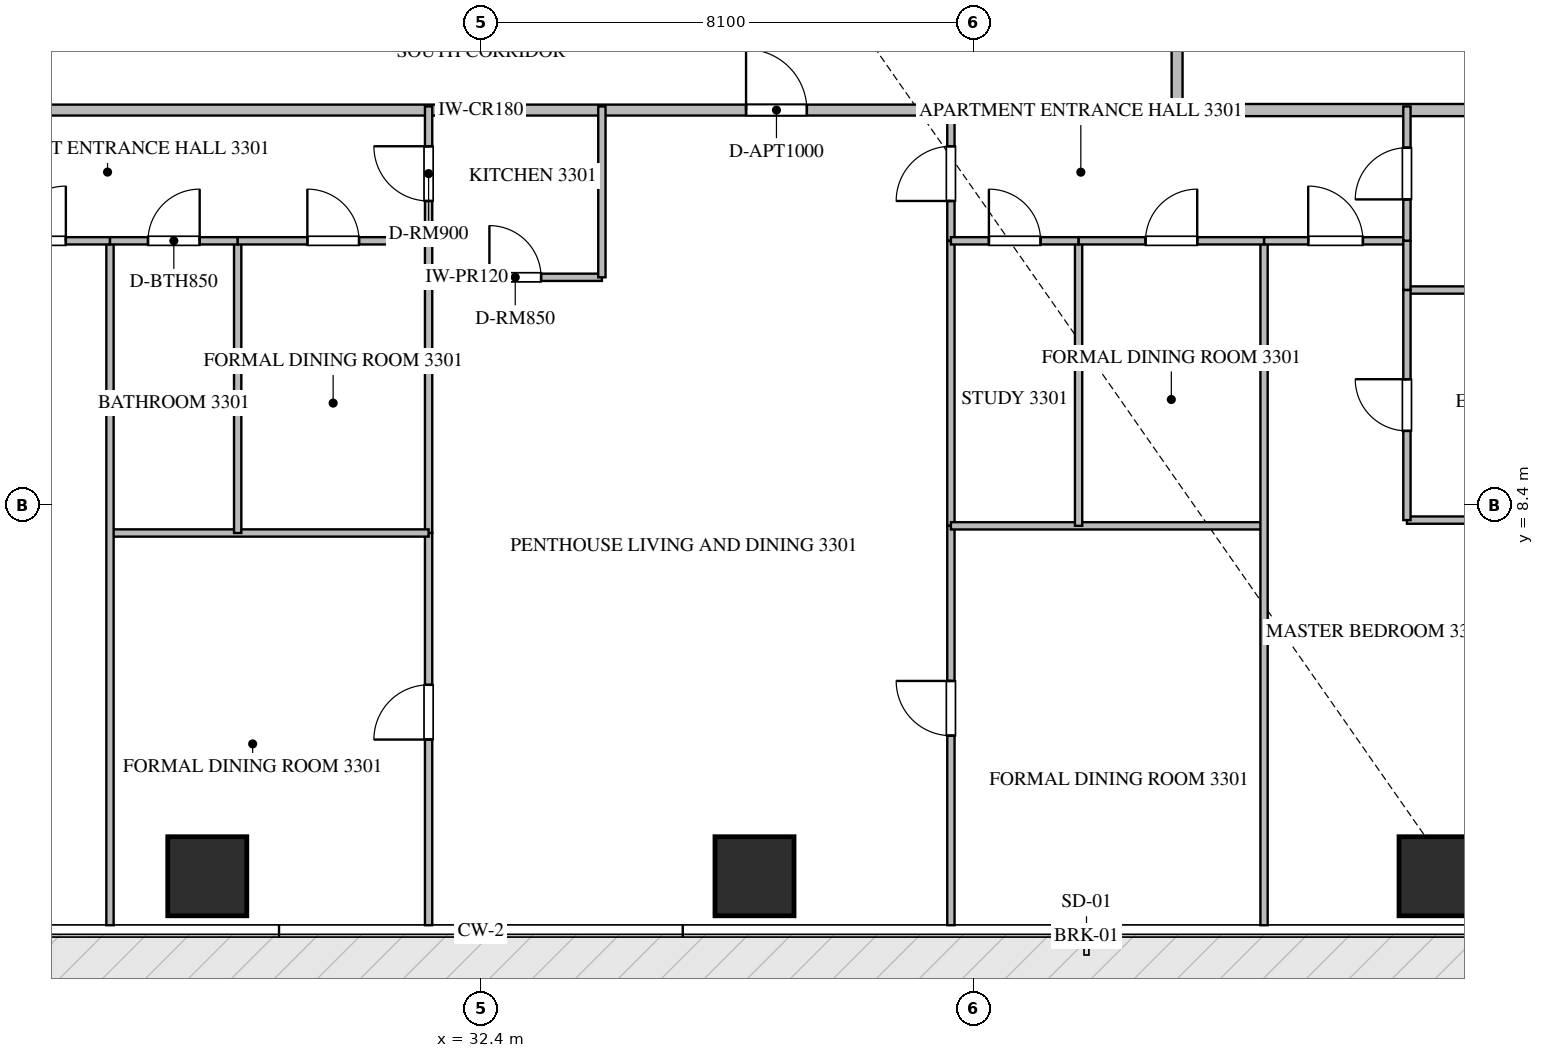
"""IFC4 building model, lengths in metres.
Left out: names, types, materials, properties, quantities, classifications, styles, units other than length and angle.
Written with IfcOpenShell. Run it as: python <this file> out.ifc"""

import sys

from ifc_helpers import new_model, si_unit, direction, frame, frame_2d, origin, origin_2d, place, context, subcontext, project, spatial, rectangle, extrude, source, transform, mapped, element, fill, save


model = new_model("IFC4")
c1 = context("Model", 3, precision=1e-05, world=origin(), true_north=direction((0.0, 1.0)))
c2 = subcontext(c1, "Body", "Model", "MODEL_VIEW")
j1 = project(units=[si_unit("LENGTHUNIT", "METRE"), si_unit("PLANEANGLEUNIT", "RADIAN")], contexts=[c1])
p1 = place(None, origin())
s1 = spatial("IfcSite", under=j1, at=p1, CompositionType="ELEMENT")
p2 = place(p1, origin())
s2 = spatial("IfcBuilding", under=s1, at=p2, CompositionType="ELEMENT")
p3 = place(p2, frame((0.0, 0.0, 135.15)))
s3 = spatial("IfcBuildingStorey", under=s2, at=p3, CompositionType="ELEMENT", Elevation=135.15)
m1 = source(origin(), c2, "Body", "SweptSolid", [
    extrude(rectangle(XDim=1.3, YDim=1.3, at=origin_2d()), origin(), (0.0, 0.0, 1.0), 3.75),
])
for number, where, z_axis, x_axis in (
    (1, (27.9, 2.3, -0.26), (0.0, 0.0, 1.0), (1.0, 0.0, 0.0)),
    (2, (36.9, 2.3, -0.26), (0.0, 0.0, 1.0), (1.0, 0.0, 0.0)),
    (3, (48.15, 2.3, -0.26), (0.0, 0.0, 1.0), (1.0, 0.0, 0.0)),
):
    element("IfcColumn", number, at=place(p3, frame(where, z_axis=z_axis, x_axis=x_axis)), inside=s3, PredefinedType="COLUMN", context=c2, shape_type="MappedRepresentation", body=[
        mapped(m1, transform((0.0, 0.0, 0.0), scale=1.0)),
    ])
p4 = place(p3, frame((43.85, 14.9, 0.0), z_axis=(0.0, 0.0, 1.0), x_axis=(1.0, 0.0, 0.0)))
e4 = element("IfcWall", 4, at=p4, inside=s3, PredefinedType="PARTITIONING", context=c2, shape_type="SweptSolid", body=[
    extrude(rectangle(XDim=13.068, YDim=0.2, at=frame_2d((6.534, 0.0))), origin(), (0.0, 0.0, 1.0), 3.49),
])
p5 = place(p3, frame((20.952, 14.9, 0.0), z_axis=(0.0, 0.0, 1.0), x_axis=(1.0, 0.0, 0.0)))
e5 = element("IfcWall", 5, at=p5, inside=s3, PredefinedType="PARTITIONING", context=c2, shape_type="SweptSolid", body=[
    extrude(rectangle(XDim=22.896, YDim=0.18, at=frame_2d((11.448, 0.0))), origin(), (0.0, 0.0, 1.0), 3.49),
])
p6 = place(p5, frame((15.809, 0.0, 0.0)))
e6 = element("IfcOpeningElement", 6, at=p6, cuts=e5, PredefinedType="OPENING", context=c2, shape_type="SweptSolid", body=[
    extrude(rectangle(XDim=1.0, YDim=2.15, at=frame_2d((0.5, 1.075))), frame((0.0, 0.1, 0.0), z_axis=(0.0, -1.0, 0.0), x_axis=(1.0, 0.0, 0.0)), (0.0, 0.0, 1.0), 0.2),
])
p7 = place(p3, frame((43.85, 14.9, 0.0), z_axis=(0.0, 0.0, 1.0), x_axis=(0.0, 1.0, 0.0)))
e7 = element("IfcWall", 7, at=p7, inside=s3, PredefinedType="PARTITIONING", context=c2, shape_type="SweptSolid", body=[
    extrude(rectangle(XDim=18.7, YDim=0.18, at=frame_2d((9.35, 0.0))), origin(), (0.0, 0.0, 1.0), 3.49),
])
p8 = place(p7, frame((1.805, 0.0, 0.0)))
e8 = element("IfcOpeningElement", 8, at=p8, cuts=e7, PredefinedType="OPENING", context=c2, shape_type="SweptSolid", body=[
    extrude(rectangle(XDim=1.0, YDim=2.15, at=frame_2d((0.5, 1.075))), frame((0.0, 0.1, 0.0), z_axis=(0.0, -1.0, 0.0), x_axis=(1.0, 0.0, 0.0)), (0.0, 0.0, 1.0), 0.2),
])
p9 = place(p3, frame((31.54, 12.15, 0.0), z_axis=(0.0, 0.0, 1.0), x_axis=(1.0, 0.0, 0.0)))
e9 = element("IfcWall", 9, at=p9, inside=s3, PredefinedType="PARTITIONING", context=c2, shape_type="SweptSolid", body=[
    extrude(rectangle(XDim=2.85, YDim=0.12, at=frame_2d((1.425, 0.0))), origin(), (0.0, 0.0, 1.0), 3.49),
])
p10 = place(p9, frame((1.0, 0.0, 0.0)))
e10 = element("IfcOpeningElement", 10, at=p10, cuts=e9, PredefinedType="OPENING", context=c2, shape_type="SweptSolid", body=[
    extrude(rectangle(XDim=0.85, YDim=2.1, at=frame_2d((0.425, 1.05))), frame((0.0, 0.07, 0.0), z_axis=(0.0, -1.0, 0.0), x_axis=(1.0, 0.0, 0.0)), (0.0, 0.0, 1.0), 0.14),
])
p11 = place(p3, frame((34.39, 12.15, 0.0), z_axis=(0.0, 0.0, 1.0), x_axis=(0.0, 1.0, 0.0)))
e11 = element("IfcWall", 11, at=p11, inside=s3, PredefinedType="PARTITIONING", context=c2, shape_type="SweptSolid", body=[
    extrude(rectangle(XDim=2.81, YDim=0.12, at=frame_2d((1.405, 0.0))), origin(), (0.0, 0.0, 1.0), 3.49),
])
p12 = place(p3, frame((31.54, 12.75, 0.0), z_axis=(0.0, 0.0, 1.0), x_axis=(0.0, 1.0, 0.0)))
e12 = element("IfcWall", 12, at=p12, inside=s3, PredefinedType="PARTITIONING", context=c2, shape_type="SweptSolid", body=[
    extrude(rectangle(XDim=2.21, YDim=0.12, at=frame_2d((1.105, 0.0))), origin(), (0.0, 0.0, 1.0), 3.49),
])
p13 = place(p12, frame((0.655, 0.0, 0.0)))
e13 = element("IfcOpeningElement", 13, at=p13, cuts=e12, PredefinedType="OPENING", context=c2, shape_type="SweptSolid", body=[
    extrude(rectangle(XDim=0.9, YDim=2.1, at=frame_2d((0.45, 1.05))), frame((0.0, 0.07, 0.0), z_axis=(0.0, -1.0, 0.0), x_axis=(1.0, 0.0, 0.0)), (0.0, 0.0, 1.0), 0.14),
])
p14 = place(p3, frame((31.54, 1.495, 0.0), z_axis=(0.0, 0.0, 1.0), x_axis=(0.0, 1.0, 0.0)))
e14 = element("IfcWall", 14, at=p14, inside=s3, PredefinedType="PARTITIONING", context=c2, shape_type="SweptSolid", body=[
    extrude(rectangle(XDim=6.45, YDim=0.12, at=frame_2d((3.225, 0.0))), origin(), (0.0, 0.0, 1.0), 3.49),
])
p15 = place(p14, frame((3.053, 0.0, 0.0)))
e15 = element("IfcOpeningElement", 15, at=p15, cuts=e14, PredefinedType="OPENING", context=c2, shape_type="SweptSolid", body=[
    extrude(rectangle(XDim=0.9, YDim=2.1, at=frame_2d((0.45, 1.05))), frame((0.0, 0.07, 0.0), z_axis=(0.0, -1.0, 0.0), x_axis=(1.0, 0.0, 0.0)), (0.0, 0.0, 1.0), 0.14),
])
p16 = place(p3, frame((31.54, 7.947, 0.0), z_axis=(0.0, 0.0, 1.0), x_axis=(0.0, 1.0, 0.0)))
e16 = element("IfcWall", 16, at=p16, inside=s3, PredefinedType="PARTITIONING", context=c2, shape_type="SweptSolid", body=[
    extrude(rectangle(XDim=4.801, YDim=0.12, at=frame_2d((2.4, 0.0))), origin(), (0.0, 0.0, 1.0), 3.49),
])
p17 = place(p3, frame((26.3, 7.945, 0.0), z_axis=(0.0, 0.0, 1.0), x_axis=(1.0, 0.0, 0.0)))
e17 = element("IfcWall", 17, at=p17, inside=s3, PredefinedType="PARTITIONING", context=c2, shape_type="SweptSolid", body=[
    extrude(rectangle(XDim=5.24, YDim=0.12, at=frame_2d((2.62, 0.0))), origin(), (0.0, 0.0, 1.0), 3.49),
])
p18 = place(p3, frame((26.3, 1.495, 0.0), z_axis=(0.0, 0.0, 1.0), x_axis=(0.0, 1.0, 0.0)))
e18 = element("IfcWall", 18, at=p18, inside=s3, PredefinedType="PARTITIONING", context=c2, shape_type="SweptSolid", body=[
    extrude(rectangle(XDim=11.255, YDim=0.12, at=frame_2d((5.627, 0.0))), origin(), (0.0, 0.0, 1.0), 3.49),
])
p19 = place(p3, frame((28.4, 7.945, 0.0), z_axis=(0.0, 0.0, 1.0), x_axis=(0.0, 1.0, 0.0)))
e19 = element("IfcWall", 19, at=p19, inside=s3, PredefinedType="PARTITIONING", context=c2, shape_type="SweptSolid", body=[
    extrude(rectangle(XDim=4.805, YDim=0.12, at=frame_2d((2.402, 0.0))), origin(), (0.0, 0.0, 1.0), 3.49),
])
p20 = place(p3, frame((26.3, 12.75, 0.0), z_axis=(0.0, 0.0, 1.0), x_axis=(1.0, 0.0, 0.0)))
e20 = element("IfcWall", 20, at=p20, inside=s3, PredefinedType="PARTITIONING", context=c2, shape_type="SweptSolid", body=[
    extrude(rectangle(XDim=2.1, YDim=0.12, at=frame_2d((1.05, 0.0))), origin(), (0.0, 0.0, 1.0), 3.49),
])
p21 = place(p20, frame((0.625, 0.0, 0.0)))
e21 = element("IfcOpeningElement", 21, at=p21, cuts=e20, PredefinedType="OPENING", context=c2, shape_type="SweptSolid", body=[
    extrude(rectangle(XDim=0.85, YDim=2.1, at=frame_2d((0.425, 1.05))), frame((0.0, 0.07, 0.0), z_axis=(0.0, -1.0, 0.0), x_axis=(1.0, 0.0, 0.0)), (0.0, 0.0, 1.0), 0.14),
])
p22 = place(p3, frame((28.402, 12.75, 0.0), z_axis=(0.0, 0.0, 1.0), x_axis=(1.0, 0.0, 0.0)))
e22 = element("IfcWall", 22, at=p22, inside=s3, PredefinedType="PARTITIONING", context=c2, shape_type="SweptSolid", body=[
    extrude(rectangle(XDim=3.138, YDim=0.12, at=frame_2d((1.569, 0.0))), origin(), (0.0, 0.0, 1.0), 3.49),
])
p23 = place(p22, frame((1.144, 0.0, 0.0)))
e23 = element("IfcOpeningElement", 23, at=p23, cuts=e22, PredefinedType="OPENING", context=c2, shape_type="SweptSolid", body=[
    extrude(rectangle(XDim=0.85, YDim=2.1, at=frame_2d((0.425, 1.05))), frame((0.0, 0.07, 0.0), z_axis=(0.0, -1.0, 0.0), x_axis=(1.0, 0.0, 0.0)), (0.0, 0.0, 1.0), 0.14),
])
p24 = place(p3, frame((23.95, 12.75, 0.0), z_axis=(0.0, 0.0, 1.0), x_axis=(1.0, 0.0, 0.0)))
e24 = element("IfcWall", 24, at=p24, inside=s3, PredefinedType="PARTITIONING", context=c2, shape_type="SweptSolid", body=[
    extrude(rectangle(XDim=2.348, YDim=0.12, at=frame_2d((1.174, 0.0))), origin(), (0.0, 0.0, 1.0), 3.49),
])
p25 = place(p24, frame((0.724, 0.0, 0.0)))
e25 = element("IfcOpeningElement", 25, at=p25, cuts=e24, PredefinedType="OPENING", context=c2, shape_type="SweptSolid", body=[
    extrude(rectangle(XDim=0.9, YDim=2.1, at=frame_2d((0.45, 1.05))), frame((0.0, 0.07, 0.0), z_axis=(0.0, -1.0, 0.0), x_axis=(1.0, 0.0, 0.0)), (0.0, 0.0, 1.0), 0.14),
])
p26 = place(p3, frame((40.13, 12.75, 0.0), z_axis=(0.0, 0.0, 1.0), x_axis=(0.0, 1.0, 0.0)))
e26 = element("IfcWall", 26, at=p26, inside=s3, PredefinedType="PARTITIONING", context=c2, shape_type="SweptSolid", body=[
    extrude(rectangle(XDim=2.21, YDim=0.12, at=frame_2d((1.105, 0.0))), origin(), (0.0, 0.0, 1.0), 3.49),
])
p27 = place(p26, frame((0.655, 0.0, 0.0)))
e27 = element("IfcOpeningElement", 27, at=p27, cuts=e26, PredefinedType="OPENING", context=c2, shape_type="SweptSolid", body=[
    extrude(rectangle(XDim=0.9, YDim=2.1, at=frame_2d((0.45, 1.05))), frame((0.0, 0.07, 0.0), z_axis=(0.0, -1.0, 0.0), x_axis=(1.0, 0.0, 0.0)), (0.0, 0.0, 1.0), 0.14),
])
p28 = place(p3, frame((40.13, 1.495, 0.0), z_axis=(0.0, 0.0, 1.0), x_axis=(0.0, 1.0, 0.0)))
e28 = element("IfcWall", 28, at=p28, inside=s3, PredefinedType="PARTITIONING", context=c2, shape_type="SweptSolid", body=[
    extrude(rectangle(XDim=6.568, YDim=0.12, at=frame_2d((3.284, 0.0))), origin(), (0.0, 0.0, 1.0), 3.49),
])
p29 = place(p28, frame((3.117, 0.0, 0.0)))
e29 = element("IfcOpeningElement", 29, at=p29, cuts=e28, PredefinedType="OPENING", context=c2, shape_type="SweptSolid", body=[
    extrude(rectangle(XDim=0.9, YDim=2.1, at=frame_2d((0.45, 1.05))), frame((0.0, 0.07, 0.0), z_axis=(0.0, -1.0, 0.0), x_axis=(1.0, 0.0, 0.0)), (0.0, 0.0, 1.0), 0.14),
])
p30 = place(p3, frame((40.13, 8.065, 0.0), z_axis=(0.0, 0.0, 1.0), x_axis=(0.0, 1.0, 0.0)))
e30 = element("IfcWall", 30, at=p30, inside=s3, PredefinedType="PARTITIONING", context=c2, shape_type="SweptSolid", body=[
    extrude(rectangle(XDim=4.683, YDim=0.12, at=frame_2d((2.342, 0.0))), origin(), (0.0, 0.0, 1.0), 3.49),
])
p31 = place(p3, frame((40.13, 8.063, 0.0), z_axis=(0.0, 0.0, 1.0), x_axis=(1.0, 0.0, 0.0)))
e31 = element("IfcWall", 31, at=p31, inside=s3, PredefinedType="PARTITIONING", context=c2, shape_type="SweptSolid", body=[
    extrude(rectangle(XDim=5.15, YDim=0.12, at=frame_2d((2.575, 0.0))), origin(), (0.0, 0.0, 1.0), 3.49),
])
p32 = place(p3, frame((45.28, 1.495, 0.0), z_axis=(0.0, 0.0, 1.0), x_axis=(0.0, 1.0, 0.0)))
e32 = element("IfcWall", 32, at=p32, inside=s3, PredefinedType="PARTITIONING", context=c2, shape_type="SweptSolid", body=[
    extrude(rectangle(XDim=11.255, YDim=0.12, at=frame_2d((5.627, 0.0))), origin(), (0.0, 0.0, 1.0), 3.49),
])
p33 = place(p3, frame((42.23, 8.063, 0.0), z_axis=(0.0, 0.0, 1.0), x_axis=(0.0, 1.0, 0.0)))
e33 = element("IfcWall", 33, at=p33, inside=s3, PredefinedType="PARTITIONING", context=c2, shape_type="SweptSolid", body=[
    extrude(rectangle(XDim=4.687, YDim=0.12, at=frame_2d((2.344, 0.0))), origin(), (0.0, 0.0, 1.0), 3.49),
])
p34 = place(p3, frame((40.13, 12.75, 0.0), z_axis=(0.0, 0.0, 1.0), x_axis=(1.0, 0.0, 0.0)))
e34 = element("IfcWall", 34, at=p34, inside=s3, PredefinedType="PARTITIONING", context=c2, shape_type="SweptSolid", body=[
    extrude(rectangle(XDim=2.1, YDim=0.12, at=frame_2d((1.05, 0.0))), origin(), (0.0, 0.0, 1.0), 3.49),
])
p35 = place(p34, frame((0.625, 0.0, 0.0)))
e35 = element("IfcOpeningElement", 35, at=p35, cuts=e34, PredefinedType="OPENING", context=c2, shape_type="SweptSolid", body=[
    extrude(rectangle(XDim=0.85, YDim=2.1, at=frame_2d((0.425, 1.05))), frame((0.0, 0.07, 0.0), z_axis=(0.0, -1.0, 0.0), x_axis=(1.0, 0.0, 0.0)), (0.0, 0.0, 1.0), 0.14),
])
p36 = place(p3, frame((42.232, 12.75, 0.0), z_axis=(0.0, 0.0, 1.0), x_axis=(1.0, 0.0, 0.0)))
e36 = element("IfcWall", 36, at=p36, inside=s3, PredefinedType="PARTITIONING", context=c2, shape_type="SweptSolid", body=[
    extrude(rectangle(XDim=3.048, YDim=0.12, at=frame_2d((1.524, 0.0))), origin(), (0.0, 0.0, 1.0), 3.49),
])
p37 = place(p36, frame((1.099, 0.0, 0.0)))
e37 = element("IfcOpeningElement", 37, at=p37, cuts=e36, PredefinedType="OPENING", context=c2, shape_type="SweptSolid", body=[
    extrude(rectangle(XDim=0.85, YDim=2.1, at=frame_2d((0.425, 1.05))), frame((0.0, 0.07, 0.0), z_axis=(0.0, -1.0, 0.0), x_axis=(1.0, 0.0, 0.0)), (0.0, 0.0, 1.0), 0.14),
])
p38 = place(p3, frame((45.282, 12.75, 0.0), z_axis=(0.0, 0.0, 1.0), x_axis=(1.0, 0.0, 0.0)))
e38 = element("IfcWall", 38, at=p38, inside=s3, PredefinedType="PARTITIONING", context=c2, shape_type="SweptSolid", body=[
    extrude(rectangle(XDim=2.348, YDim=0.12, at=frame_2d((1.174, 0.0))), origin(), (0.0, 0.0, 1.0), 3.49),
])
p39 = place(p38, frame((0.724, 0.0, 0.0)))
e39 = element("IfcOpeningElement", 39, at=p39, cuts=e38, PredefinedType="OPENING", context=c2, shape_type="SweptSolid", body=[
    extrude(rectangle(XDim=0.9, YDim=2.1, at=frame_2d((0.45, 1.05))), frame((0.0, 0.07, 0.0), z_axis=(0.0, -1.0, 0.0), x_axis=(1.0, 0.0, 0.0)), (0.0, 0.0, 1.0), 0.14),
])
for number, where, z_axis, x_axis in (
    (40, (47.63, 8.157, 0.0), (0.0, 0.0, 1.0), (1.0, 0.0, 0.0)),
    (41, (47.63, 11.941, 0.0), (0.0, 0.0, 1.0), (1.0, 0.0, 0.0)),
):
    element("IfcWall", number, at=place(p3, frame(where, z_axis=z_axis, x_axis=x_axis)), inside=s3, PredefinedType="PARTITIONING", context=c2, shape_type="SweptSolid", body=[
        extrude(rectangle(XDim=3.7, YDim=0.12, at=frame_2d((1.85, 0.0))), origin(), (0.0, 0.0, 1.0), 3.49),
    ])
p40 = place(p3, frame((47.63, 8.157, 0.0), z_axis=(0.0, 0.0, 1.0), x_axis=(0.0, 1.0, 0.0)))
e42 = element("IfcWall", 42, at=p40, inside=s3, PredefinedType="PARTITIONING", context=c2, shape_type="SweptSolid", body=[
    extrude(rectangle(XDim=3.784, YDim=0.12, at=frame_2d((1.892, 0.0))), origin(), (0.0, 0.0, 1.0), 3.49),
])
p41 = place(p40, frame((1.467, 0.0, 0.0)))
e43 = element("IfcOpeningElement", 43, at=p41, cuts=e42, PredefinedType="OPENING", context=c2, shape_type="SweptSolid", body=[
    extrude(rectangle(XDim=0.85, YDim=2.1, at=frame_2d((0.425, 1.05))), frame((0.0, 0.07, 0.0), z_axis=(0.0, -1.0, 0.0), x_axis=(1.0, 0.0, 0.0)), (0.0, 0.0, 1.0), 0.14),
])
p42 = place(p3, frame((47.63, 11.943, 0.0), z_axis=(0.0, 0.0, 1.0), x_axis=(0.0, 1.0, 0.0)))
e44 = element("IfcWall", 44, at=p42, inside=s3, PredefinedType="PARTITIONING", context=c2, shape_type="SweptSolid", body=[
    extrude(rectangle(XDim=0.807, YDim=0.12, at=frame_2d((0.403, 0.0))), origin(), (0.0, 0.0, 1.0), 3.49),
])
p43 = place(p3, frame((47.63, 12.752, 0.0), z_axis=(0.0, 0.0, 1.0), x_axis=(0.0, 1.0, 0.0)))
e45 = element("IfcWall", 45, at=p43, inside=s3, PredefinedType="PARTITIONING", context=c2, shape_type="SweptSolid", body=[
    extrude(rectangle(XDim=2.208, YDim=0.12, at=frame_2d((1.104, 0.0))), origin(), (0.0, 0.0, 1.0), 3.49),
])
p44 = place(p43, frame((0.679, 0.0, 0.0)))
e46 = element("IfcOpeningElement", 46, at=p44, cuts=e45, PredefinedType="OPENING", context=c2, shape_type="SweptSolid", body=[
    extrude(rectangle(XDim=0.85, YDim=2.1, at=frame_2d((0.425, 1.05))), frame((0.0, 0.07, 0.0), z_axis=(0.0, -1.0, 0.0), x_axis=(1.0, 0.0, 0.0)), (0.0, 0.0, 1.0), 0.14),
])
m2 = source(origin(), c2, "Body", "SweptSolid", [
    extrude(rectangle(XDim=1.0, YDim=2.15, at=frame_2d((0.5, 1.075))), frame((0.0, 0.025, 0.0), z_axis=(0.0, -1.0, 0.0), x_axis=(1.0, 0.0, 0.0)), (0.0, 0.0, 1.0), 0.05),
])
p45 = place(p6, origin())
e47 = element("IfcDoor", 47, at=p45, inside=s3, OperationType="SINGLE_SWING_LEFT", PredefinedType="DOOR", context=c2, shape_type="MappedRepresentation", body=[
    mapped(m2, transform((0.0, 0.0, 0.0), scale=1.0)),
])
fill(e6, e47)
m3 = source(origin(), c2, "Body", "SweptSolid", [
    extrude(rectangle(XDim=0.85, YDim=2.1, at=frame_2d((0.425, 1.05))), frame((0.0, 0.025, 0.0), z_axis=(0.0, -1.0, 0.0), x_axis=(1.0, 0.0, 0.0)), (0.0, 0.0, 1.0), 0.05),
])
p46 = place(p10, origin())
e48 = element("IfcDoor", 48, at=p46, inside=s3, OperationType="SINGLE_SWING_LEFT", PredefinedType="DOOR", context=c2, shape_type="MappedRepresentation", body=[
    mapped(m3, transform((0.0, 0.0, 0.0), scale=1.0)),
])
fill(e10, e48)
m4 = source(origin(), c2, "Body", "SweptSolid", [
    extrude(rectangle(XDim=0.9, YDim=2.1, at=frame_2d((0.45, 1.05))), frame((0.0, 0.025, 0.0), z_axis=(0.0, -1.0, 0.0), x_axis=(1.0, 0.0, 0.0)), (0.0, 0.0, 1.0), 0.05),
])
p47 = place(p13, origin())
e49 = element("IfcDoor", 49, at=p47, inside=s3, OperationType="SINGLE_SWING_RIGHT", PredefinedType="DOOR", context=c2, shape_type="MappedRepresentation", body=[
    mapped(m4, transform((0.0, 0.0, 0.0), scale=1.0)),
])
fill(e13, e49)
p48 = place(p15, origin())
e50 = element("IfcDoor", 50, at=p48, inside=s3, OperationType="SINGLE_SWING_LEFT", PredefinedType="DOOR", context=c2, shape_type="MappedRepresentation", body=[
    mapped(m4, transform((0.0, 0.0, 0.0), scale=1.0)),
])
fill(e15, e50)
p49 = place(p21, origin())
e51 = element("IfcDoor", 51, at=p49, inside=s3, OperationType="SINGLE_SWING_RIGHT", PredefinedType="DOOR", context=c2, shape_type="MappedRepresentation", body=[
    mapped(m3, transform((0.0, 0.0, 0.0), scale=1.0)),
])
fill(e21, e51)
p50 = place(p23, origin())
e52 = element("IfcDoor", 52, at=p50, inside=s3, OperationType="SINGLE_SWING_LEFT", PredefinedType="DOOR", context=c2, shape_type="MappedRepresentation", body=[
    mapped(m3, transform((0.0, 0.0, 0.0), scale=1.0)),
])
fill(e23, e52)
p51 = place(p25, origin())
e53 = element("IfcDoor", 53, at=p51, inside=s3, OperationType="SINGLE_SWING_RIGHT", PredefinedType="DOOR", context=c2, shape_type="MappedRepresentation", body=[
    mapped(m4, transform((0.0, 0.0, 0.0), scale=1.0)),
])
fill(e25, e53)
p52 = place(p27, origin())
e54 = element("IfcDoor", 54, at=p52, inside=s3, OperationType="SINGLE_SWING_LEFT", PredefinedType="DOOR", context=c2, shape_type="MappedRepresentation", body=[
    mapped(m4, transform((0.0, 0.0, 0.0), scale=1.0)),
])
fill(e27, e54)
p53 = place(p29, origin())
e55 = element("IfcDoor", 55, at=p53, inside=s3, OperationType="SINGLE_SWING_RIGHT", PredefinedType="DOOR", context=c2, shape_type="MappedRepresentation", body=[
    mapped(m4, transform((0.0, 0.0, 0.0), scale=1.0)),
])
fill(e29, e55)
p54 = place(p35, origin())
e56 = element("IfcDoor", 56, at=p54, inside=s3, OperationType="SINGLE_SWING_LEFT", PredefinedType="DOOR", context=c2, shape_type="MappedRepresentation", body=[
    mapped(m3, transform((0.0, 0.0, 0.0), scale=1.0)),
])
fill(e35, e56)
p55 = place(p37, origin())
e57 = element("IfcDoor", 57, at=p55, inside=s3, OperationType="SINGLE_SWING_RIGHT", PredefinedType="DOOR", context=c2, shape_type="MappedRepresentation", body=[
    mapped(m3, transform((0.0, 0.0, 0.0), scale=1.0)),
])
fill(e37, e57)
p56 = place(p39, origin())
e58 = element("IfcDoor", 58, at=p56, inside=s3, OperationType="SINGLE_SWING_LEFT", PredefinedType="DOOR", context=c2, shape_type="MappedRepresentation", body=[
    mapped(m4, transform((0.0, 0.0, 0.0), scale=1.0)),
])
fill(e39, e58)
p57 = place(p41, origin())
e59 = element("IfcDoor", 59, at=p57, inside=s3, OperationType="SINGLE_SWING_RIGHT", PredefinedType="DOOR", context=c2, shape_type="MappedRepresentation", body=[
    mapped(m3, transform((0.0, 0.0, 0.0), scale=1.0)),
])
fill(e43, e59)
p58 = place(p44, origin())
e60 = element("IfcDoor", 60, at=p58, inside=s3, OperationType="SINGLE_SWING_LEFT", PredefinedType="DOOR", context=c2, shape_type="MappedRepresentation", body=[
    mapped(m3, transform((0.0, 0.0, 0.0), scale=1.0)),
])
fill(e46, e60)
save(model, sys.argv[1])
